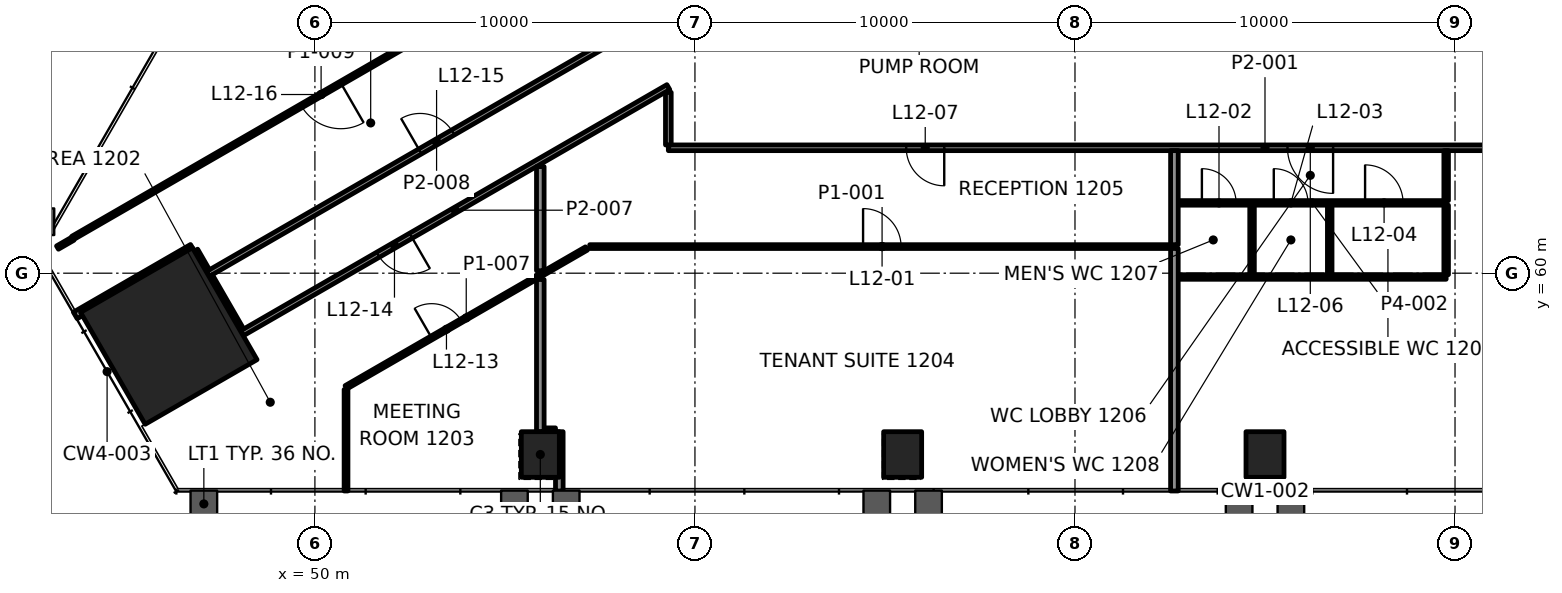
"""IFC4 building model, lengths in metres.
Left out: names, types, materials, properties, quantities, classifications, styles, units other than length and angle.
Written with IfcOpenShell. Run it as: python <this file> out.ifc"""

import sys

from ifc_helpers import new_model, si_unit, direction, frame, frame_2d, origin, origin_2d, place, context, subcontext, project, spatial, rectangle, extrude, element, fill, save


model = new_model("IFC4")
c1 = context("Model", 3, precision=1e-05, world=origin(), true_north=direction((0.0, 1.0)))
c2 = subcontext(c1, "Body", "Model", "MODEL_VIEW")
j1 = project(units=[si_unit("LENGTHUNIT", "METRE"), si_unit("PLANEANGLEUNIT", "RADIAN")], contexts=[c1])
p1 = place(None, origin())
s1 = spatial("IfcSite", under=j1, at=p1, CompositionType="ELEMENT")
p2 = place(p1, origin())
s2 = spatial("IfcBuilding", under=s1, at=p2, CompositionType="ELEMENT")
p3 = place(p2, frame((0.0, 0.0, 56.8)))
s3 = spatial("IfcBuildingStorey", under=s2, at=p3, CompositionType="ELEMENT", Elevation=56.8)
p4 = place(p3, frame((46.156, 58.347, 0.0), z_axis=(0.0, 0.0, 1.0), x_axis=(0.5, -0.866025403784, 0.0)))
e1 = element("IfcColumn", 1, at=p4, inside=s3, PredefinedType="COLUMN", context=c2, shape_type="SweptSolid", body=[
    extrude(rectangle(XDim=3.4, YDim=3.4, at=origin_2d()), origin(), (0.0, 0.0, 1.0), 4.2),
])
for number, where, z_axis, x_axis in (
    (2, (55.931, 55.229, -0.0), (0.0, 0.0, 1.0), (1.0, 0.0, 0.0)),
    (3, (65.466, 55.229, -0.0), (0.0, 0.0, 1.0), (1.0, 0.0, 0.0)),
    (4, (75.0, 55.229, -0.0), (0.0, 0.0, 1.0), (1.0, 0.0, 0.0)),
):
    element("IfcColumn", number, at=place(p3, frame(where, z_axis=z_axis, x_axis=x_axis)), inside=s3, PredefinedType="COLUMN", context=c2, shape_type="SweptSolid", body=[
        extrude(rectangle(XDim=1.0, YDim=1.2, at=origin_2d()), origin(), (0.0, 0.0, 1.0), 4.2),
    ])
p5 = place(p3, frame((56.031, 55.829, 0.0), z_axis=(0.0, 0.0, 1.0), x_axis=(1.0, 0.0, 0.0)))
e5 = element("IfcWall", 5, at=p5, inside=s3, PredefinedType="PARTITIONING", context=c2, shape_type="SweptSolid", body=[
    extrude(rectangle(XDim=0.3, YDim=0.2, at=frame_2d((0.15, 0.0))), origin(), (0.0, 0.0, 1.0), 3.4),
])
p6 = place(p3, frame((72.717, 59.9, 0.0), z_axis=(0.0, 0.0, 1.0), x_axis=(1.0, 0.0, 0.0)))
e6 = element("IfcWall", 6, at=p6, inside=s3, PredefinedType="PARTITIONING", context=c2, shape_type="SweptSolid", body=[
    extrude(rectangle(XDim=7.05, YDim=0.12, at=frame_2d((3.525, 0.0))), origin(), (0.0, 0.0, 1.0), 3.4),
])
p7 = place(p3, frame((57.232, 60.7, 0.0), z_axis=(0.0, 0.0, 1.0), x_axis=(1.0, 0.0, 0.0)))
e7 = element("IfcWall", 7, at=p7, inside=s3, PredefinedType="PARTITIONING", context=c2, shape_type="SweptSolid", body=[
    extrude(rectangle(XDim=15.385, YDim=0.1, at=frame_2d((7.692, 0.0))), origin(), (0.0, 0.0, 1.0), 3.4),
])
p8 = place(p7, frame((7.192, 0.0, 0.0)))
e8 = element("IfcOpeningElement", 8, at=p8, cuts=e7, PredefinedType="OPENING", context=c2, shape_type="SweptSolid", body=[
    extrude(rectangle(XDim=1.0, YDim=2.1, at=frame_2d((0.5, 1.05))), frame((0.0, 0.06, 0.0), z_axis=(0.0, -1.0, 0.0), x_axis=(1.0, 0.0, 0.0)), (0.0, 0.0, 1.0), 0.12),
])
p9 = place(p3, frame((72.716, 61.85, 0.0), z_axis=(0.0, 0.0, 1.0), x_axis=(1.0, 0.0, 0.0)))
e9 = element("IfcWall", 9, at=p9, inside=s3, PredefinedType="PARTITIONING", context=c2, shape_type="SweptSolid", body=[
    extrude(rectangle(XDim=7.051, YDim=0.12, at=frame_2d((3.525, 0.0))), origin(), (0.0, 0.0, 1.0), 3.4),
])
p10 = place(p9, frame((0.623, 0.0, 0.0)))
e10 = element("IfcOpeningElement", 10, at=p10, cuts=e9, PredefinedType="OPENING", context=c2, shape_type="SweptSolid", body=[
    extrude(rectangle(XDim=0.9, YDim=2.1, at=frame_2d((0.45, 1.05))), frame((0.0, 0.07, 0.0), z_axis=(0.0, -1.0, 0.0), x_axis=(1.0, 0.0, 0.0)), (0.0, 0.0, 1.0), 0.14),
])
p11 = place(p9, frame((2.515, 0.0, 0.0)))
e11 = element("IfcOpeningElement", 11, at=p11, cuts=e9, PredefinedType="OPENING", context=c2, shape_type="SweptSolid", body=[
    extrude(rectangle(XDim=0.9, YDim=2.1, at=frame_2d((0.45, 1.05))), frame((0.0, 0.07, 0.0), z_axis=(0.0, -1.0, 0.0), x_axis=(1.0, 0.0, 0.0)), (0.0, 0.0, 1.0), 0.14),
])
p12 = place(p9, frame((4.917, 0.0, 0.0)))
e12 = element("IfcOpeningElement", 12, at=p12, cuts=e9, PredefinedType="OPENING", context=c2, shape_type="SweptSolid", body=[
    extrude(rectangle(XDim=1.0, YDim=2.1, at=frame_2d((0.5, 1.05))), frame((0.0, 0.07, 0.0), z_axis=(0.0, -1.0, 0.0), x_axis=(1.0, 0.0, 0.0)), (0.0, 0.0, 1.0), 0.14),
])
p13 = place(p3, frame((90.699, 63.3, 0.0), z_axis=(0.0, 0.0, 1.0), x_axis=(-1.0, 0.0, 0.0)))
e13 = element("IfcWall", 13, at=p13, inside=s3, PredefinedType="PARTITIONING", context=c2, shape_type="SweptSolid", body=[
    extrude(rectangle(XDim=31.399, YDim=0.15, at=frame_2d((15.7, 0.0))), origin(), (0.0, 0.0, 1.0), 3.4),
])
p14 = place(p13, frame((4.968, 0.0, 0.0)))
e14 = element("IfcOpeningElement", 14, at=p14, cuts=e13, PredefinedType="OPENING", context=c2, shape_type="SweptSolid", body=[
    extrude(rectangle(XDim=1.2, YDim=2.1, at=frame_2d((0.6, 1.05))), frame((0.0, 0.085, 0.0), z_axis=(0.0, -1.0, 0.0), x_axis=(1.0, 0.0, 0.0)), (0.0, 0.0, 1.0), 0.17),
])
p15 = place(p13, frame((13.908, 0.0, 0.0)))
e15 = element("IfcOpeningElement", 15, at=p15, cuts=e13, PredefinedType="OPENING", context=c2, shape_type="SweptSolid", body=[
    extrude(rectangle(XDim=1.2, YDim=2.1, at=frame_2d((0.6, 1.05))), frame((0.0, 0.085, 0.0), z_axis=(0.0, -1.0, 0.0), x_axis=(1.0, 0.0, 0.0)), (0.0, 0.0, 1.0), 0.17),
])
p16 = place(p13, frame((24.14, 0.0, 0.0)))
e16 = element("IfcOpeningElement", 16, at=p16, cuts=e13, PredefinedType="OPENING", context=c2, shape_type="SweptSolid", body=[
    extrude(rectangle(XDim=1.0, YDim=2.1, at=frame_2d((0.5, 1.05))), frame((0.0, 0.085, 0.0), z_axis=(0.0, -1.0, 0.0), x_axis=(1.0, 0.0, 0.0)), (0.0, 0.0, 1.0), 0.17),
])
p17 = place(p3, frame((50.819, 56.998, 0.0), z_axis=(0.0, 0.0, 1.0), x_axis=(0.866023631393, 0.50000306986, 0.0)))
e17 = element("IfcWall", 17, at=p17, inside=s3, PredefinedType="PARTITIONING", context=c2, shape_type="SweptSolid", body=[
    extrude(rectangle(XDim=7.305, YDim=0.1, at=frame_2d((3.653, 0.0))), origin(), (0.0, 0.0, 1.0), 3.4),
])
p18 = place(p17, frame((2.602, 0.0, 0.0)))
e18 = element("IfcOpeningElement", 18, at=p18, cuts=e17, PredefinedType="OPENING", context=c2, shape_type="SweptSolid", body=[
    extrude(rectangle(XDim=0.9, YDim=2.1, at=frame_2d((0.45, 1.05))), frame((0.0, 0.06, 0.0), z_axis=(0.0, -1.0, 0.0), x_axis=(1.0, 0.0, 0.0)), (0.0, 0.0, 1.0), 0.12),
])
p19 = place(p3, frame((59.3, 64.896, 0.0), z_axis=(0.0, 0.0, 1.0), x_axis=(-0.86602302899, -0.500004113243, 0.0)))
e19 = element("IfcWall", 19, at=p19, inside=s3, PredefinedType="PARTITIONING", context=c2, shape_type="SweptSolid", body=[
    extrude(rectangle(XDim=12.956, YDim=0.15, at=frame_2d((6.478, 0.0))), origin(), (0.0, 0.0, 1.0), 3.247),
])
p20 = place(p19, frame((7.821, 0.0, 0.0)))
e20 = element("IfcOpeningElement", 20, at=p20, cuts=e19, PredefinedType="OPENING", context=c2, shape_type="SweptSolid", body=[
    extrude(rectangle(XDim=1.0, YDim=2.1, at=frame_2d((0.5, 1.05))), frame((0.0, 0.085, 0.0), z_axis=(0.0, -1.0, 0.0), x_axis=(1.0, 0.0, 0.0)), (0.0, 0.0, 1.0), 0.17),
])
p21 = place(p3, frame((47.178, 59.976, 0.0), z_axis=(0.0, 0.0, 1.0), x_axis=(0.866019280802, 0.500010605167, 0.0)))
e21 = element("IfcWall", 21, at=p21, inside=s3, PredefinedType="PARTITIONING", context=c2, shape_type="SweptSolid", body=[
    extrude(rectangle(XDim=13.91, YDim=0.15, at=frame_2d((6.955, 0.0))), origin(), (0.0, 0.0, 1.0), 3.4),
])
p22 = place(p21, frame((6.455, 0.0, 0.0)))
e22 = element("IfcOpeningElement", 22, at=p22, cuts=e21, PredefinedType="OPENING", context=c2, shape_type="SweptSolid", body=[
    extrude(rectangle(XDim=1.0, YDim=2.1, at=frame_2d((0.5, 1.05))), frame((0.0, 0.085, 0.0), z_axis=(0.0, -1.0, 0.0), x_axis=(1.0, 0.0, 0.0)), (0.0, 0.0, 1.0), 0.17),
])
p23 = place(p3, frame((43.695, 58.888, 0.0), z_axis=(0.0, 0.0, 1.0), x_axis=(0.866031398331, 0.499989616998, 0.0)))
e23 = element("IfcWall", 23, at=p23, inside=s3, PredefinedType="PARTITIONING", context=c2, shape_type="SweptSolid", body=[
    extrude(rectangle(XDim=3.56, YDim=0.2, at=frame_2d((1.78, 0.0))), origin(), (0.0, 0.0, 1.0), 3.4),
])
p24 = place(p3, frame((43.226, 60.674, 0.0), z_axis=(0.0, 0.0, 1.0), x_axis=(0.866073792734, 0.499916178513, 0.0)))
e24 = element("IfcWall", 24, at=p24, inside=s3, PredefinedType="PARTITIONING", context=c2, shape_type="SweptSolid", body=[
    extrude(rectangle(XDim=0.473, YDim=0.1, at=frame_2d((0.236, 0.0))), origin(), (0.0, 0.0, 1.0), 3.4),
])
p25 = place(p3, frame((56.7, 68.476, 0.0), z_axis=(0.0, 0.0, 1.0), x_axis=(-0.866026152489, -0.499998703203, 0.0)))
e25 = element("IfcWall", 25, at=p25, inside=s3, PredefinedType="PARTITIONING", context=c2, shape_type="SweptSolid", body=[
    extrude(rectangle(XDim=15.096, YDim=0.1, at=frame_2d((7.548, 0.0))), origin(), (0.0, 0.0, 1.0), 3.4),
])
p26 = place(p25, frame((6.948, 0.0, 0.0)))
e26 = element("IfcOpeningElement", 26, at=p26, cuts=e25, PredefinedType="OPENING", context=c2, shape_type="SweptSolid", body=[
    extrude(rectangle(XDim=1.2, YDim=2.1, at=frame_2d((0.6, 1.05))), frame((0.0, 0.06, 0.0), z_axis=(0.0, -1.0, 0.0), x_axis=(1.0, 0.0, 0.0)), (0.0, 0.0, 1.0), 0.12),
])
p27 = place(p3, frame((79.767, 59.96, 0.0), z_axis=(0.0, 0.0, 1.0), x_axis=(0.0, 1.0, 0.0)))
e27 = element("IfcWall", 27, at=p27, inside=s3, PredefinedType="PARTITIONING", context=c2, shape_type="SweptSolid", body=[
    extrude(rectangle(XDim=1.83, YDim=0.12, at=frame_2d((0.915, 0.0))), origin(), (0.0, 0.0, 1.0), 3.4),
])
for number, where, z_axis, x_axis in (
    (28, (76.703, 59.96, 0.0), (0.0, 0.0, 1.0), (0.0, 1.0, 0.0)),
    (29, (74.659, 59.96, 0.0), (0.0, 0.0, 1.0), (0.0, 1.0, 0.0)),
):
    element("IfcWall", number, at=place(p3, frame(where, z_axis=z_axis, x_axis=x_axis)), inside=s3, PredefinedType="PARTITIONING", context=c2, shape_type="SweptSolid", body=[
        extrude(rectangle(XDim=1.83, YDim=0.12, at=frame_2d((0.915, 0.0))), origin(), (0.0, 0.0, 1.0), 3.4),
    ])
p28 = place(p3, frame((72.616, 54.269, 0.0), z_axis=(0.0, 0.0, 1.0), x_axis=(0.0, 1.0, 0.0)))
e30 = element("IfcWall", 30, at=p28, inside=s3, PredefinedType="PARTITIONING", context=c2, shape_type="SweptSolid", body=[
    extrude(rectangle(XDim=6.381, YDim=0.2, at=frame_2d((3.19, 0.0))), origin(), (0.0, 0.0, 1.0), 3.165),
])
p29 = place(p3, frame((59.3, 63.375, 0.0), z_axis=(0.0, 0.0, 1.0), x_axis=(0.0, 1.0, 0.0)))
e31 = element("IfcWall", 31, at=p29, inside=s3, PredefinedType="PARTITIONING", context=c2, shape_type="SweptSolid", body=[
    extrude(rectangle(XDim=1.385, YDim=0.15, at=frame_2d((0.692, 0.0))), origin(), (0.0, 0.0, 1.0), 3.247),
])
p30 = place(p3, frame((56.431, 54.269, 0.0), z_axis=(0.0, 0.0, 1.0), x_axis=(0.0, 1.0, 0.0)))
e32 = element("IfcWall", 32, at=p30, inside=s3, PredefinedType="PARTITIONING", context=c2, shape_type="SweptSolid", body=[
    extrude(rectangle(XDim=1.56, YDim=0.2, at=frame_2d((0.78, 0.0))), origin(), (0.0, 0.0, 1.0), 3.165),
])
p31 = place(p3, frame((55.931, 55.829, 0.0), z_axis=(0.0, 0.0, 1.0), x_axis=(0.0, 1.0, 0.0)))
e33 = element("IfcWall", 33, at=p31, inside=s3, PredefinedType="PARTITIONING", context=c2, shape_type="SweptSolid", body=[
    extrude(rectangle(XDim=4.005, YDim=0.2, at=frame_2d((2.002, 0.0))), origin(), (0.0, 0.0, 1.0), 3.4),
])
p32 = place(p3, frame((50.819, 54.269, 0.0), z_axis=(0.0, 0.0, 1.0), x_axis=(0.0, 1.0, 0.0)))
e34 = element("IfcWall", 34, at=p32, inside=s3, PredefinedType="PARTITIONING", context=c2, shape_type="SweptSolid", body=[
    extrude(rectangle(XDim=2.671, YDim=0.1, at=frame_2d((1.335, 0.0))), origin(), (0.0, 0.0, 1.0), 3.4),
])
p33 = place(p3, frame((48.039, 58.485, 0.0), z_axis=(0.0, 0.0, 1.0), x_axis=(-0.499949127178, 0.86605477323, 0.0)))
e35 = element("IfcWall", 35, at=p33, inside=s3, PredefinedType="PARTITIONING", context=c2, shape_type="SweptSolid", body=[
    extrude(rectangle(XDim=1.647, YDim=0.2, at=frame_2d((0.824, 0.0))), origin(), (0.0, 0.0, 1.0), 3.247),
])
p34 = place(p3, frame((72.616, 60.75, 0.0), z_axis=(0.0, 0.0, 1.0), x_axis=(0.0, 1.0, 0.0)))
e36 = element("IfcWall", 36, at=p34, inside=s3, PredefinedType="PARTITIONING", context=c2, shape_type="SweptSolid", body=[
    extrude(rectangle(XDim=2.475, YDim=0.2, at=frame_2d((1.238, 0.0))), origin(), (0.0, 0.0, 1.0), 3.4),
])
p35 = place(p3, frame((79.767, 61.91, 0.0), z_axis=(0.0, 0.0, 1.0), x_axis=(0.0, 1.0, 0.0)))
e37 = element("IfcWall", 37, at=p35, inside=s3, PredefinedType="PARTITIONING", context=c2, shape_type="SweptSolid", body=[
    extrude(rectangle(XDim=1.315, YDim=0.12, at=frame_2d((0.657, 0.0))), origin(), (0.0, 0.0, 1.0), 3.4),
])
p36 = place(p3, frame((55.931, 60.065, 0.0), z_axis=(0.0, 0.0, 1.0), x_axis=(0.0, 1.0, 0.0)))
e38 = element("IfcWall", 38, at=p36, inside=s3, PredefinedType="PARTITIONING", context=c2, shape_type="SweptSolid", body=[
    extrude(rectangle(XDim=2.74, YDim=0.2, at=frame_2d((1.37, 0.0))), origin(), (0.0, 0.0, 1.0), 3.4),
])
p37 = place(p3, frame((47.14, 60.041, 0.0), z_axis=(0.0, 0.0, 1.0), x_axis=(-0.500049599607, 0.865996765544, 0.0)))
e39 = element("IfcWall", 39, at=p37, inside=s3, PredefinedType="PARTITIONING", context=c2, shape_type="SweptSolid", body=[
    extrude(rectangle(XDim=0.625, YDim=0.2, at=frame_2d((0.312, 0.0))), origin(), (0.0, 0.0, 1.0), 3.4),
])
p38 = place(p8, origin())
e40 = element("IfcDoor", 40, at=p38, inside=s3, OperationType="SINGLE_SWING_LEFT", PredefinedType="DOOR", context=c2, shape_type="SweptSolid", body=[
    extrude(rectangle(XDim=1.0, YDim=2.1, at=frame_2d((0.5, 1.05))), frame((0.0, 0.025, 0.0), z_axis=(0.0, -1.0, 0.0), x_axis=(1.0, 0.0, 0.0)), (0.0, 0.0, 1.0), 0.05),
])
fill(e8, e40)
p39 = place(p10, origin())
e41 = element("IfcDoor", 41, at=p39, inside=s3, OperationType="SINGLE_SWING_RIGHT", PredefinedType="DOOR", context=c2, shape_type="SweptSolid", body=[
    extrude(rectangle(XDim=0.9, YDim=2.1, at=frame_2d((0.45, 1.05))), frame((0.0, 0.025, 0.0), z_axis=(0.0, -1.0, 0.0), x_axis=(1.0, 0.0, 0.0)), (0.0, 0.0, 1.0), 0.05),
])
fill(e10, e41)
p40 = place(p11, origin())
e42 = element("IfcDoor", 42, at=p40, inside=s3, OperationType="SINGLE_SWING_LEFT", PredefinedType="DOOR", context=c2, shape_type="SweptSolid", body=[
    extrude(rectangle(XDim=0.9, YDim=2.1, at=frame_2d((0.45, 1.05))), frame((0.0, 0.025, 0.0), z_axis=(0.0, -1.0, 0.0), x_axis=(1.0, 0.0, 0.0)), (0.0, 0.0, 1.0), 0.05),
])
fill(e11, e42)
p41 = place(p12, origin())
e43 = element("IfcDoor", 43, at=p41, inside=s3, OperationType="SINGLE_SWING_RIGHT", PredefinedType="DOOR", context=c2, shape_type="SweptSolid", body=[
    extrude(rectangle(XDim=1.0, YDim=2.1, at=frame_2d((0.5, 1.05))), frame((0.0, 0.025, 0.0), z_axis=(0.0, -1.0, 0.0), x_axis=(1.0, 0.0, 0.0)), (0.0, 0.0, 1.0), 0.05),
])
fill(e12, e43)
p42 = place(p15, origin())
e44 = element("IfcDoor", 44, at=p42, inside=s3, OperationType="DOUBLE_DOOR_SINGLE_SWING", PredefinedType="DOOR", context=c2, shape_type="SweptSolid", body=[
    extrude(rectangle(XDim=1.2, YDim=2.1, at=frame_2d((0.6, 1.05))), frame((0.0, 0.025, 0.0), z_axis=(0.0, -1.0, 0.0), x_axis=(1.0, 0.0, 0.0)), (0.0, 0.0, 1.0), 0.05),
])
fill(e15, e44)
p43 = place(p16, origin())
e45 = element("IfcDoor", 45, at=p43, inside=s3, OperationType="SINGLE_SWING_LEFT", PredefinedType="DOOR", context=c2, shape_type="SweptSolid", body=[
    extrude(rectangle(XDim=1.0, YDim=2.1, at=frame_2d((0.5, 1.05))), frame((0.0, 0.025, 0.0), z_axis=(0.0, -1.0, 0.0), x_axis=(1.0, 0.0, 0.0)), (0.0, 0.0, 1.0), 0.05),
])
fill(e16, e45)
p44 = place(p18, origin())
e46 = element("IfcDoor", 46, at=p44, inside=s3, OperationType="SINGLE_SWING_RIGHT", PredefinedType="DOOR", context=c2, shape_type="SweptSolid", body=[
    extrude(rectangle(XDim=0.9, YDim=2.1, at=frame_2d((0.45, 1.05))), frame((0.0, 0.025, 0.0), z_axis=(0.0, -1.0, 0.0), x_axis=(1.0, 0.0, 0.0)), (0.0, 0.0, 1.0), 0.05),
])
fill(e18, e46)
p45 = place(p20, origin())
e47 = element("IfcDoor", 47, at=p45, inside=s3, OperationType="SINGLE_SWING_RIGHT", PredefinedType="DOOR", context=c2, shape_type="SweptSolid", body=[
    extrude(rectangle(XDim=1.0, YDim=2.1, at=frame_2d((0.5, 1.05))), frame((0.0, 0.025, 0.0), z_axis=(0.0, -1.0, 0.0), x_axis=(1.0, 0.0, 0.0)), (0.0, 0.0, 1.0), 0.05),
])
fill(e20, e47)
p46 = place(p22, origin())
e48 = element("IfcDoor", 48, at=p46, inside=s3, OperationType="SINGLE_SWING_LEFT", PredefinedType="DOOR", context=c2, shape_type="SweptSolid", body=[
    extrude(rectangle(XDim=1.0, YDim=2.1, at=frame_2d((0.5, 1.05))), frame((0.0, 0.025, 0.0), z_axis=(0.0, -1.0, 0.0), x_axis=(1.0, 0.0, 0.0)), (0.0, 0.0, 1.0), 0.05),
])
fill(e22, e48)
p47 = place(p26, origin())
e49 = element("IfcDoor", 49, at=p47, inside=s3, OperationType="DOUBLE_DOOR_SINGLE_SWING", PredefinedType="DOOR", context=c2, shape_type="SweptSolid", body=[
    extrude(rectangle(XDim=1.2, YDim=2.1, at=frame_2d((0.6, 1.05))), frame((0.0, 0.025, 0.0), z_axis=(0.0, -1.0, 0.0), x_axis=(1.0, 0.0, 0.0)), (0.0, 0.0, 1.0), 0.05),
])
fill(e26, e49)
save(model, sys.argv[1])
